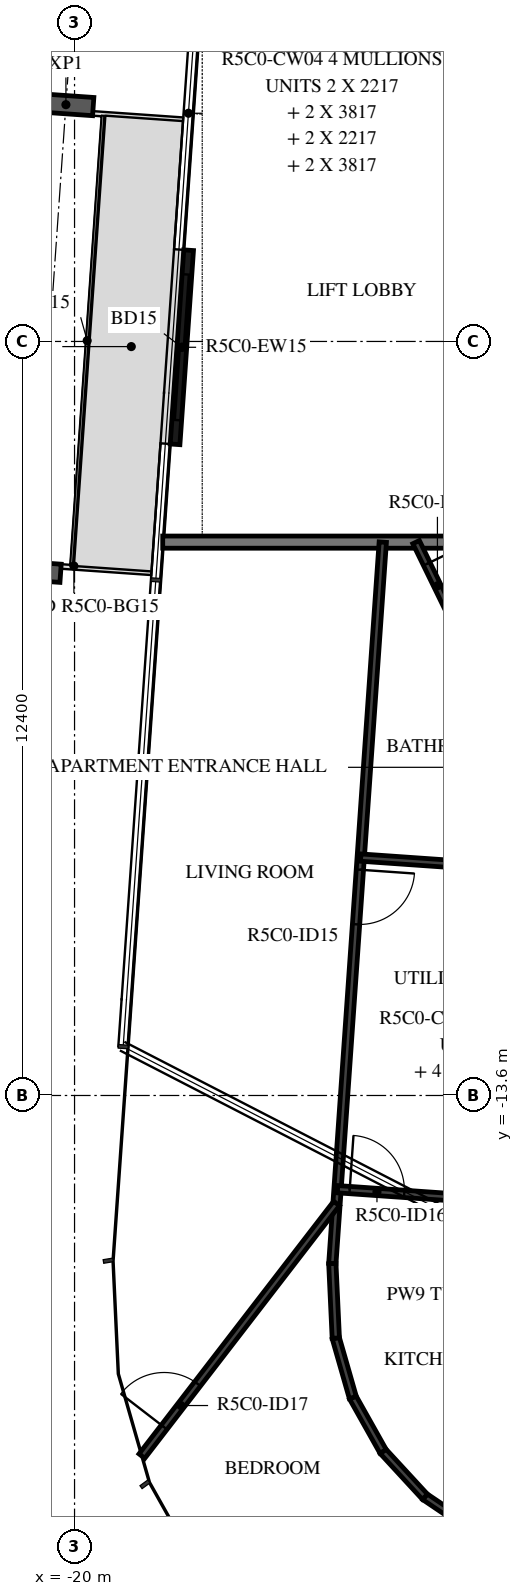
"""IFC4 building model, lengths in metres.
Left out: names, types, materials, properties, quantities, classifications, styles, units other than length and angle.
Written with IfcOpenShell. Run it as: python <this file> out.ifc"""

import sys

from ifc_helpers import new_model, si_unit, direction, frame, frame_2d, origin, origin_2d, place, context, subcontext, project, spatial, rectangle, i_section, extrude, element, fill, save


model = new_model("IFC4")
c1 = context("Model", 3, precision=1e-05, world=origin(), true_north=direction((0.0, 1.0)))
c2 = subcontext(c1, "Body", "Model", "MODEL_VIEW")
j1 = project(units=[si_unit("LENGTHUNIT", "METRE"), si_unit("PLANEANGLEUNIT", "RADIAN")], contexts=[c1])
p1 = place(None, origin())
s1 = spatial("IfcSite", under=j1, at=p1, CompositionType="ELEMENT")
p2 = place(p1, origin())
s2 = spatial("IfcBuilding", under=s1, at=p2, CompositionType="ELEMENT")
p3 = place(p2, frame((0.0, 0.0, 216.4)))
s3 = spatial("IfcBuildingStorey", under=s2, at=p3, CompositionType="ELEMENT", Elevation=216.4)
for number, where, z_axis, x_axis in (
    (1, (-20.142, 2.694, -0.38), (0.0, 0.0, 1.0), (0.07, 0.998, 0.0)),
    (2, (-20.679, -4.981, -0.38), (0.0, 0.0, 1.0), (0.07, 0.998, 0.0)),
):
    element("IfcColumn", number, at=place(p3, frame(where, z_axis=z_axis, x_axis=x_axis)), inside=s3, PredefinedType="COLUMN", context=c2, shape_type="SweptSolid", body=[
        extrude(i_section(OverallWidth=0.3, OverallDepth=0.9, WebThickness=0.019, FlangeThickness=0.035, FilletRadius=0.03, at=origin_2d()), origin(), (0.0, 0.0, 1.0), 2.616),
    ])
p4 = place(p3, frame((-18.124, 0.301, 0.0), z_axis=(0.0, 0.0, 1.0), x_axis=(-0.069728915792, -0.997565976917, 0.0)))
e3 = element("IfcWall", 3, at=p4, inside=s3, PredefinedType="STANDARD", context=c2, shape_type="SweptSolid", body=[
    extrude(rectangle(XDim=3.2, YDim=0.16, at=frame_2d((1.6, 0.0))), origin(), (0.0, 0.0, 1.0), 3.05),
])
p5 = place(p4, frame((0.4, 0.0, 0.0)))
e4 = element("IfcOpeningElement", 4, at=p5, cuts=e3, PredefinedType="OPENING", context=c2, shape_type="SweptSolid", body=[
    extrude(rectangle(XDim=2.4, YDim=2.4, at=frame_2d((1.2, 1.2))), frame((0.0, 0.09, 0.0), z_axis=(0.0, -1.0, 0.0), x_axis=(1.0, 0.0, 0.0)), (0.0, 0.0, 1.0), 0.18),
])
p6 = place(p3, frame((-18.55, -4.5, 0.0), z_axis=(0.0, 0.0, 1.0), x_axis=(1.0, 0.0, 0.0)))
e5 = element("IfcWall", 5, at=p6, inside=s3, PredefinedType="STANDARD", context=c2, shape_type="SweptSolid", body=[
    extrude(rectangle(XDim=7.438, YDim=0.2, at=frame_2d((3.719, 0.0))), origin(), (0.0, 0.0, 1.0), 3.05),
])
p7 = place(p3, frame((-14.979, -24.017, 0.0), z_axis=(0.0, 0.0, 1.0), x_axis=(0.449732900329, 0.89316309729, 0.0)))
e6 = element("IfcWall", 6, at=p7, inside=s3, PredefinedType="STANDARD", context=c2, shape_type="SweptSolid", body=[
    extrude(rectangle(XDim=5.229, YDim=0.2, at=frame_2d((2.615, 0.0))), origin(), (0.0, 0.0, 1.0), 3.05),
])
p8 = place(p3, frame((-14.383, -4.5, 0.0), z_axis=(0.0, 0.0, 1.0), x_axis=(0.438393414895, -0.898783185077, 0.0)))
e7 = element("IfcWall", 7, at=p8, inside=s3, PredefinedType="PARTITIONING", context=c2, shape_type="SweptSolid", body=[
    extrude(rectangle(XDim=6.049, YDim=0.12, at=frame_2d((3.024, 0.0))), origin(), (0.0, 0.0, 1.0), 3.05),
])
p9 = place(p8, frame((0.4, 0.0, 0.0)))
e8 = element("IfcOpeningElement", 8, at=p9, cuts=e7, PredefinedType="OPENING", context=c2, shape_type="SweptSolid", body=[
    extrude(rectangle(XDim=0.8, YDim=2.1, at=frame_2d((0.4, 1.05))), frame((0.0, 0.07, 0.0), z_axis=(0.0, -1.0, 0.0), x_axis=(1.0, 0.0, 0.0)), (0.0, 0.0, 1.0), 0.14),
])
p10 = place(p3, frame((-14.931, -4.5, 0.0), z_axis=(0.0, 0.0, 1.0), x_axis=(-0.069751708439, -0.997564383471, 0.0)))
e9 = element("IfcWall", 9, at=p10, inside=s3, PredefinedType="PARTITIONING", context=c2, shape_type="SweptSolid", body=[
    extrude(rectangle(XDim=11.894, YDim=0.12, at=frame_2d((5.947, 0.0))), origin(), (0.0, 0.0, 1.0), 3.05),
])
p11 = place(p10, frame((5.4, 0.0, 0.0)))
e10 = element("IfcOpeningElement", 10, at=p11, cuts=e9, PredefinedType="OPENING", context=c2, shape_type="SweptSolid", body=[
    extrude(rectangle(XDim=0.9, YDim=2.1, at=frame_2d((0.45, 1.05))), frame((0.0, 0.07, 0.0), z_axis=(0.0, -1.0, 0.0), x_axis=(1.0, 0.0, 0.0)), (0.0, 0.0, 1.0), 0.14),
])
p12 = place(p3, frame((-15.294, -9.688, 0.0), z_axis=(0.0, 0.0, 1.0), x_axis=(0.997565819809, -0.069731163391, 0.0)))
e11 = element("IfcWall", 11, at=p12, inside=s3, PredefinedType="PARTITIONING", context=c2, shape_type="SweptSolid", body=[
    extrude(rectangle(XDim=3.571, YDim=0.12, at=frame_2d((1.786, 0.0))), origin(), (0.0, 0.0, 1.0), 3.05),
])
p13 = place(p3, frame((-18.892, -19.531, 0.0), z_axis=(0.0, 0.0, 1.0), x_axis=(0.610347240441, 0.792133982408, 0.0)))
e12 = element("IfcWall", 12, at=p13, inside=s3, PredefinedType="PARTITIONING", context=c2, shape_type="SweptSolid", body=[
    extrude(rectangle(XDim=5.244, YDim=0.12, at=frame_2d((2.622, 0.0))), origin(), (0.0, 0.0, 1.0), 3.05),
])
p14 = place(p13, frame((0.6, 0.0, 0.0)))
e13 = element("IfcOpeningElement", 13, at=p14, cuts=e12, PredefinedType="OPENING", context=c2, shape_type="SweptSolid", body=[
    extrude(rectangle(XDim=0.9, YDim=2.1, at=frame_2d((0.45, 1.05))), frame((0.0, 0.07, 0.0), z_axis=(0.0, -1.0, 0.0), x_axis=(1.0, 0.0, 0.0)), (0.0, 0.0, 1.0), 0.14),
])
p15 = place(p3, frame((-15.675, -15.141, 0.0), z_axis=(0.0, 0.0, 1.0), x_axis=(0.997563107735, -0.06976995117, 0.0)))
e14 = element("IfcWall", 14, at=p15, inside=s3, PredefinedType="PARTITIONING", context=c2, shape_type="SweptSolid", body=[
    extrude(rectangle(XDim=4.146, YDim=0.12, at=frame_2d((2.073, 0.0))), origin(), (0.0, 0.0, 1.0), 3.05),
])
p16 = place(p15, frame((0.2, 0.0, 0.0)))
e15 = element("IfcOpeningElement", 15, at=p16, cuts=e14, PredefinedType="OPENING", context=c2, shape_type="SweptSolid", body=[
    extrude(rectangle(XDim=0.9, YDim=2.1, at=frame_2d((0.45, 1.05))), frame((0.0, 0.07, 0.0), z_axis=(0.0, -1.0, 0.0), x_axis=(1.0, 0.0, 0.0)), (0.0, 0.0, 1.0), 0.14),
])
for number, where, z_axis, x_axis in (
    (16, (-13.395, -20.767, 0.0), (0.0, 0.0, 1.0), (-0.829, 0.559, 0.0)),
    (17, (-14.237, -20.199, 0.0), (0.0, 0.0, 1.0), (-0.678, 0.735, 0.0)),
):
    element("IfcWall", number, at=place(p3, frame(where, z_axis=z_axis, x_axis=x_axis)), inside=s3, PredefinedType="PARTITIONING", context=c2, shape_type="SweptSolid", body=[
        extrude(rectangle(XDim=1.016, YDim=0.12, at=frame_2d((0.508, 0.0))), origin(), (0.0, 0.0, 1.0), 3.05),
    ])
p17 = place(p3, frame((-14.926, -19.452, 0.0), z_axis=(0.0, 0.0, 1.0), x_axis=(-0.489941776958, 0.871755157823, 0.0)))
e18 = element("IfcWall", 18, at=p17, inside=s3, PredefinedType="PARTITIONING", context=c2, shape_type="SweptSolid", body=[
    extrude(rectangle(XDim=1.016, YDim=0.12, at=frame_2d((0.508, 0.0))), origin(), (0.0, 0.0, 1.0), 3.05),
])
p18 = place(p3, frame((-15.424, -18.567, 0.0), z_axis=(0.0, 0.0, 1.0), x_axis=(-0.275641454312, 0.961260520704, 0.0)))
e19 = element("IfcWall", 19, at=p18, inside=s3, PredefinedType="PARTITIONING", context=c2, shape_type="SweptSolid", body=[
    extrude(rectangle(XDim=1.016, YDim=0.12, at=frame_2d((0.508, 0.0))), origin(), (0.0, 0.0, 1.0), 3.05),
])
p19 = place(p3, frame((-15.704, -17.59, 0.0), z_axis=(0.0, 0.0, 1.0), x_axis=(-0.046364428258, 0.998924591645, 0.0)))
e20 = element("IfcWall", 20, at=p19, inside=s3, PredefinedType="PARTITIONING", context=c2, shape_type="SweptSolid", body=[
    extrude(rectangle(XDim=1.227, YDim=0.12, at=frame_2d((0.613, 0.0))), origin(), (0.0, 0.0, 1.0), 3.05),
])
p20 = place(p5, origin())
e21 = element("IfcDoor", 21, at=p20, inside=s3, OperationType="DOUBLE_DOOR_SLIDING", PredefinedType="DOOR", context=c2, shape_type="SweptSolid", body=[
    extrude(rectangle(XDim=2.4, YDim=2.4, at=frame_2d((1.2, 1.2))), frame((0.0, 0.025, 0.0), z_axis=(0.0, -1.0, 0.0), x_axis=(1.0, 0.0, 0.0)), (0.0, 0.0, 1.0), 0.05),
])
fill(e4, e21)
p21 = place(p9, origin())
e22 = element("IfcDoor", 22, at=p21, inside=s3, OperationType="SINGLE_SWING_RIGHT", PredefinedType="DOOR", context=c2, shape_type="SweptSolid", body=[
    extrude(rectangle(XDim=0.8, YDim=2.1, at=frame_2d((0.4, 1.05))), frame((0.0, 0.025, 0.0), z_axis=(0.0, -1.0, 0.0), x_axis=(1.0, 0.0, 0.0)), (0.0, 0.0, 1.0), 0.05),
])
fill(e8, e22)
p22 = place(p11, origin())
e23 = element("IfcDoor", 23, at=p22, inside=s3, OperationType="SINGLE_SWING_RIGHT", PredefinedType="DOOR", context=c2, shape_type="SweptSolid", body=[
    extrude(rectangle(XDim=0.9, YDim=2.1, at=frame_2d((0.45, 1.05))), frame((0.0, 0.025, 0.0), z_axis=(0.0, -1.0, 0.0), x_axis=(1.0, 0.0, 0.0)), (0.0, 0.0, 1.0), 0.05),
])
fill(e10, e23)
p23 = place(p16, origin())
e24 = element("IfcDoor", 24, at=p23, inside=s3, OperationType="SINGLE_SWING_RIGHT", PredefinedType="DOOR", context=c2, shape_type="SweptSolid", body=[
    extrude(rectangle(XDim=0.9, YDim=2.1, at=frame_2d((0.45, 1.05))), frame((0.0, 0.025, 0.0), z_axis=(0.0, -1.0, 0.0), x_axis=(1.0, 0.0, 0.0)), (0.0, 0.0, 1.0), 0.05),
])
fill(e15, e24)
p24 = place(p14, origin())
e25 = element("IfcDoor", 25, at=p24, inside=s3, OperationType="SINGLE_SWING_RIGHT", PredefinedType="DOOR", context=c2, shape_type="SweptSolid", body=[
    extrude(rectangle(XDim=0.9, YDim=2.1, at=frame_2d((0.45, 1.05))), frame((0.0, 0.025, 0.0), z_axis=(0.0, -1.0, 0.0), x_axis=(1.0, 0.0, 0.0)), (0.0, 0.0, 1.0), 0.05),
])
fill(e13, e25)
save(model, sys.argv[1])
